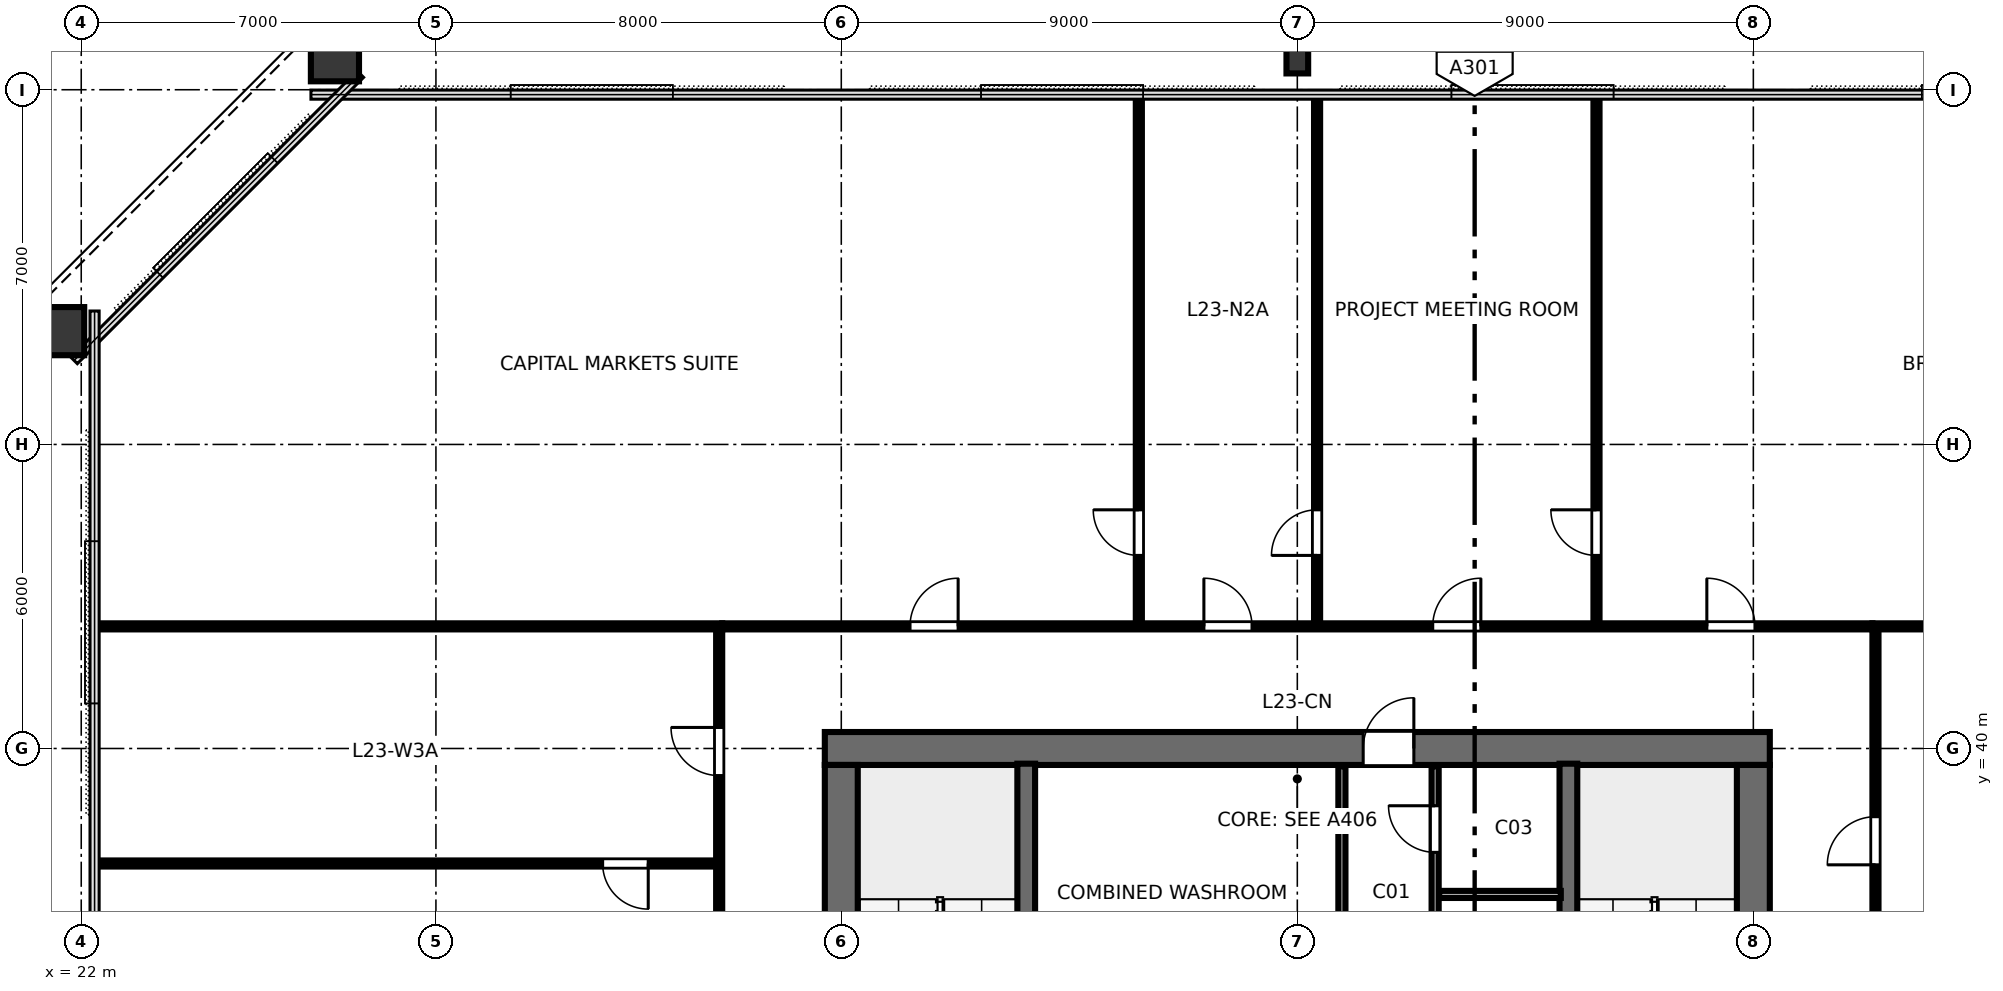
"""IFC4 building model, lengths in metres.
Left out: names, types, materials, properties, quantities, classifications, styles, units other than length and angle.
Written with IfcOpenShell. Run it as: python <this file> out.ifc"""

import sys

from ifc_helpers import new_model, si_unit, direction, frame, frame_2d, origin, origin_2d, place, context, subcontext, project, spatial, rectangle, hollow_rectangle, i_section, extrude, element, fill, save


model = new_model("IFC4")
c1 = context("Model", 3, precision=1e-05, world=origin(), true_north=direction((0.0, 1.0)))
c2 = subcontext(c1, "Body", "Model", "MODEL_VIEW")
j1 = project(units=[si_unit("LENGTHUNIT", "METRE"), si_unit("PLANEANGLEUNIT", "RADIAN")], contexts=[c1])
p1 = place(None, origin())
s1 = spatial("IfcSite", under=j1, at=p1, CompositionType="ELEMENT")
p2 = place(p1, origin())
s2 = spatial("IfcBuilding", under=s1, at=p2, CompositionType="ELEMENT")
p3 = place(p2, frame((0.0, 0.0, 90.4)))
s3 = spatial("IfcBuildingStorey", under=s2, at=p3, CompositionType="ELEMENT", Elevation=90.4)
p4 = place(p3, frame((36.675, 40.0, 0.0), z_axis=(0.0, 0.0, 1.0), x_axis=(1.0, 0.0, 0.0)))
e1 = element("IfcWall", 1, at=p4, inside=s3, PredefinedType="SHEAR", context=c2, shape_type="SweptSolid", body=[
    extrude(rectangle(XDim=18.65, YDim=0.65, at=frame_2d((9.325, 0.0))), origin(), (0.0, 0.0, 1.0), 4.56),
])
p5 = place(p4, frame((10.625, 0.0, 0.0)))
e2 = element("IfcOpeningElement", 2, at=p5, cuts=e1, PredefinedType="OPENING", context=c2, shape_type="SweptSolid", body=[
    extrude(rectangle(XDim=1.0, YDim=2.15, at=frame_2d((0.5, 1.075))), frame((0.0, 0.335, 0.0), z_axis=(0.0, -1.0, 0.0), x_axis=(1.0, 0.0, 0.0)), (0.0, 0.0, 1.0), 0.67),
])
p6 = place(p3, frame((37.0, 24.325, 0.0), z_axis=(0.0, 0.0, 1.0), x_axis=(0.0, 1.0, 0.0)))
e3 = element("IfcWall", 3, at=p6, inside=s3, PredefinedType="SHEAR", context=c2, shape_type="SweptSolid", body=[
    extrude(rectangle(XDim=15.35, YDim=0.65, at=frame_2d((7.675, 0.0))), origin(), (0.0, 0.0, 1.0), 4.56),
])
p7 = place(p6, frame((5.2, 0.0, 0.0)))
e4 = element("IfcOpeningElement", 4, at=p7, cuts=e3, PredefinedType="OPENING", context=c2, shape_type="SweptSolid", body=[
    extrude(rectangle(XDim=1.15, YDim=2.15, at=frame_2d((0.575, 1.075))), frame((0.0, 0.335, 0.0), z_axis=(0.0, -1.0, 0.0), x_axis=(1.0, 0.0, 0.0)), (0.0, 0.0, 1.0), 0.67),
])
p8 = place(p3, frame((55.0, 24.325, 0.0), z_axis=(0.0, 0.0, 1.0), x_axis=(0.0, 1.0, 0.0)))
e5 = element("IfcWall", 5, at=p8, inside=s3, PredefinedType="SHEAR", context=c2, shape_type="SweptSolid", body=[
    extrude(rectangle(XDim=15.35, YDim=0.65, at=frame_2d((7.675, 0.0))), origin(), (0.0, 0.0, 1.0), 4.56),
])
p9 = place(p8, frame((5.2, 0.0, 0.0)))
e6 = element("IfcOpeningElement", 6, at=p9, cuts=e5, PredefinedType="OPENING", context=c2, shape_type="SweptSolid", body=[
    extrude(rectangle(XDim=1.15, YDim=2.15, at=frame_2d((0.575, 1.075))), frame((0.0, 0.335, 0.0), z_axis=(0.0, -1.0, 0.0), x_axis=(1.0, 0.0, 0.0)), (0.0, 0.0, 1.0), 0.67),
])
p10 = place(p3, frame((46.0, 53.563, 0.0), z_axis=(0.0, -0.040192456322, 0.99919195676), x_axis=(1.0, 0.0, 0.0)))
e7 = element("IfcColumn", 7, at=p10, inside=s3, PredefinedType="COLUMN", context=c2, shape_type="SweptSolid", body=[
    extrude(i_section(OverallWidth=0.428, OverallDepth=0.483, WebThickness=0.051, FlangeThickness=0.082, FilletRadius=0.025, at=origin_2d()), origin(), (0.0, 0.0, 1.0), 4.562),
])
p11 = place(p3, frame((27.007, 53.741, 0.0), z_axis=(0.058022511791, -0.040444789527, 0.997495667723), x_axis=(0.571838881264, 0.820365951192, 0.0)))
e8 = element("IfcColumn", 8, at=p11, inside=s3, PredefinedType="COLUMN", context=c2, shape_type="SweptSolid", body=[
    extrude(hollow_rectangle(XDim=0.95, YDim=1.15, WallThickness=0.06, at=origin_2d()), origin(), (0.0, 0.0, 1.0), 4.57),
])
p12 = place(p3, frame((21.484, 48.236, 0.0), z_axis=(0.047661225314, -0.050760273597, 0.997572955841), x_axis=(-0.68284118346, 0.727241170725, 0.069629000955)))
e9 = element("IfcColumn", 9, at=p12, inside=s3, PredefinedType="COLUMN", context=c2, shape_type="SweptSolid", body=[
    extrude(hollow_rectangle(XDim=0.95, YDim=1.15, WallThickness=0.06, at=origin_2d()), origin(), (0.0, 0.0, 1.0), 4.569),
])
for number, where, z_axis, x_axis in (
    (10, (40.65, 32.0, 0.0), (0.0, 0.0, 1.0), (0.0, 1.0, 0.0)),
    (11, (51.35, 32.0, 0.0), (0.0, 0.0, 1.0), (0.0, 1.0, 0.0)),
):
    element("IfcWall", number, at=place(p3, frame(where, z_axis=z_axis, x_axis=x_axis)), inside=s3, PredefinedType="SHEAR", context=c2, shape_type="SweptSolid", body=[
        extrude(rectangle(XDim=7.7, YDim=0.35, at=frame_2d((3.85, 0.0))), origin(), (0.0, 0.0, 1.0), 4.8),
    ])
p13 = place(p3, frame((46.88, 32.05, 0.0), z_axis=(0.0, 0.0, 1.0), x_axis=(0.0, 1.0, 0.0)))
e12 = element("IfcWall", 12, at=p13, inside=s3, PredefinedType="PARTITIONING", context=c2, shape_type="SweptSolid", body=[
    extrude(rectangle(XDim=7.6, YDim=0.14, at=frame_2d((3.8, 0.0))), origin(), (0.0, 0.0, 1.0), 4.56),
])
p14 = place(p13, frame((3.4, 0.0, 0.0)))
e13 = element("IfcOpeningElement", 13, at=p14, cuts=e12, PredefinedType="OPENING", context=c2, shape_type="SweptSolid", body=[
    extrude(rectangle(XDim=0.95, YDim=2.15, at=frame_2d((0.475, 1.075))), frame((0.0, 0.08, 0.0), z_axis=(0.0, -1.0, 0.0), x_axis=(1.0, 0.0, 0.0)), (0.0, 0.0, 1.0), 0.16),
])
p15 = place(p3, frame((48.72, 32.05, 0.0), z_axis=(0.0, 0.0, 1.0), x_axis=(0.0, 1.0, 0.0)))
e14 = element("IfcWall", 14, at=p15, inside=s3, PredefinedType="PARTITIONING", context=c2, shape_type="SweptSolid", body=[
    extrude(rectangle(XDim=7.6, YDim=0.14, at=frame_2d((3.8, 0.0))), origin(), (0.0, 0.0, 1.0), 4.56),
])
p16 = place(p15, frame((0.8, 0.0, 0.0)))
e15 = element("IfcOpeningElement", 15, at=p16, cuts=e14, PredefinedType="OPENING", context=c2, shape_type="SweptSolid", body=[
    extrude(rectangle(XDim=0.9, YDim=2.15, at=frame_2d((0.45, 1.075))), frame((0.0, 0.08, 0.0), z_axis=(0.0, -1.0, 0.0), x_axis=(1.0, 0.0, 0.0)), (0.0, 0.0, 1.0), 0.16),
])
p17 = place(p15, frame((3.35, 0.0, 0.0)))
e16 = element("IfcOpeningElement", 16, at=p17, cuts=e14, PredefinedType="OPENING", context=c2, shape_type="SweptSolid", body=[
    extrude(rectangle(XDim=0.9, YDim=2.15, at=frame_2d((0.45, 1.075))), frame((0.0, 0.08, 0.0), z_axis=(0.0, -1.0, 0.0), x_axis=(1.0, 0.0, 0.0)), (0.0, 0.0, 1.0), 0.16),
])
p18 = place(p15, frame((5.9, 0.0, 0.0)))
e17 = element("IfcOpeningElement", 17, at=p18, cuts=e14, PredefinedType="OPENING", context=c2, shape_type="SweptSolid", body=[
    extrude(rectangle(XDim=0.92, YDim=2.15, at=frame_2d((0.46, 1.075))), frame((0.0, 0.08, 0.0), z_axis=(0.0, -1.0, 0.0), x_axis=(1.0, 0.0, 0.0)), (0.0, 0.0, 1.0), 0.16),
])
p19 = place(p3, frame((48.8, 37.12, 0.0), z_axis=(0.0, 0.0, 1.0), x_axis=(1.0, 0.0, 0.0)))
e18 = element("IfcWall", 18, at=p19, inside=s3, PredefinedType="PARTITIONING", context=c2, shape_type="SweptSolid", body=[
    extrude(rectangle(XDim=2.4, YDim=0.14, at=frame_2d((1.2, 0.0))), origin(), (0.0, 0.0, 1.0), 4.56),
])
p20 = place(p3, frame((42.872, 42.41, 0.0), z_axis=(0.0, 0.0, 1.0), x_axis=(0.0, 1.0, 0.0)))
e19 = element("IfcWall", 19, at=p20, inside=s3, PredefinedType="PARTITIONING", context=c2, shape_type="SweptSolid", body=[
    extrude(rectangle(XDim=10.493, YDim=0.12, at=frame_2d((5.247, 0.0))), origin(), (0.0, 0.0, 1.0), 3.84),
])
p21 = place(p20, frame((1.4, 0.0, 0.0)))
e20 = element("IfcOpeningElement", 20, at=p21, cuts=e19, PredefinedType="OPENING", context=c2, shape_type="SweptSolid", body=[
    extrude(rectangle(XDim=0.9, YDim=2.15, at=frame_2d((0.45, 1.075))), frame((0.0, 0.07, 0.0), z_axis=(0.0, -1.0, 0.0), x_axis=(1.0, 0.0, 0.0)), (0.0, 0.0, 1.0), 0.14),
])
p22 = place(p3, frame((46.39, 42.41, 0.0), z_axis=(0.0, 0.0, 1.0), x_axis=(0.0, 1.0, 0.0)))
e21 = element("IfcWall", 21, at=p22, inside=s3, PredefinedType="PARTITIONING", context=c2, shape_type="SweptSolid", body=[
    extrude(rectangle(XDim=10.493, YDim=0.12, at=frame_2d((5.247, 0.0))), origin(), (0.0, 0.0, 1.0), 3.84),
])
p23 = place(p22, frame((1.4, 0.0, 0.0)))
e22 = element("IfcOpeningElement", 22, at=p23, cuts=e21, PredefinedType="OPENING", context=c2, shape_type="SweptSolid", body=[
    extrude(rectangle(XDim=0.9, YDim=2.15, at=frame_2d((0.45, 1.075))), frame((0.0, 0.07, 0.0), z_axis=(0.0, -1.0, 0.0), x_axis=(1.0, 0.0, 0.0)), (0.0, 0.0, 1.0), 0.14),
])
p24 = place(p3, frame((51.904, 42.41, 0.0), z_axis=(0.0, 0.0, 1.0), x_axis=(0.0, 1.0, 0.0)))
e23 = element("IfcWall", 23, at=p24, inside=s3, PredefinedType="PARTITIONING", context=c2, shape_type="SweptSolid", body=[
    extrude(rectangle(XDim=10.493, YDim=0.12, at=frame_2d((5.247, 0.0))), origin(), (0.0, 0.0, 1.0), 3.84),
])
p25 = place(p24, frame((1.4, 0.0, 0.0)))
e24 = element("IfcOpeningElement", 24, at=p25, cuts=e23, PredefinedType="OPENING", context=c2, shape_type="SweptSolid", body=[
    extrude(rectangle(XDim=0.9, YDim=2.15, at=frame_2d((0.45, 1.075))), frame((0.0, 0.07, 0.0), z_axis=(0.0, -1.0, 0.0), x_axis=(1.0, 0.0, 0.0)), (0.0, 0.0, 1.0), 0.14),
])
p26 = place(p3, frame((34.65, 42.41, 0.0), z_axis=(0.0, 0.0, 1.0), x_axis=(1.0, 0.0, 0.0)))
e25 = element("IfcWall", 25, at=p26, inside=s3, PredefinedType="PARTITIONING", context=c2, shape_type="SweptSolid", body=[
    extrude(rectangle(XDim=22.7, YDim=0.12, at=frame_2d((11.35, 0.0))), origin(), (0.0, 0.0, 1.0), 3.84),
])
p27 = place(p26, frame((3.706, 0.0, 0.0)))
e26 = element("IfcOpeningElement", 26, at=p27, cuts=e25, PredefinedType="OPENING", context=c2, shape_type="SweptSolid", body=[
    extrude(rectangle(XDim=0.95, YDim=2.15, at=frame_2d((0.475, 1.075))), frame((0.0, 0.07, 0.0), z_axis=(0.0, -1.0, 0.0), x_axis=(1.0, 0.0, 0.0)), (0.0, 0.0, 1.0), 0.14),
])
p28 = place(p26, frame((9.506, 0.0, 0.0)))
e27 = element("IfcOpeningElement", 27, at=p28, cuts=e25, PredefinedType="OPENING", context=c2, shape_type="SweptSolid", body=[
    extrude(rectangle(XDim=0.95, YDim=2.15, at=frame_2d((0.475, 1.075))), frame((0.0, 0.07, 0.0), z_axis=(0.0, -1.0, 0.0), x_axis=(1.0, 0.0, 0.0)), (0.0, 0.0, 1.0), 0.14),
])
p29 = place(p26, frame((14.022, 0.0, 0.0)))
e28 = element("IfcOpeningElement", 28, at=p29, cuts=e25, PredefinedType="OPENING", context=c2, shape_type="SweptSolid", body=[
    extrude(rectangle(XDim=0.95, YDim=2.15, at=frame_2d((0.475, 1.075))), frame((0.0, 0.07, 0.0), z_axis=(0.0, -1.0, 0.0), x_axis=(1.0, 0.0, 0.0)), (0.0, 0.0, 1.0), 0.14),
])
p30 = place(p26, frame((19.432, 0.0, 0.0)))
e29 = element("IfcOpeningElement", 29, at=p30, cuts=e25, PredefinedType="OPENING", context=c2, shape_type="SweptSolid", body=[
    extrude(rectangle(XDim=0.95, YDim=2.15, at=frame_2d((0.475, 1.075))), frame((0.0, 0.07, 0.0), z_axis=(0.0, -1.0, 0.0), x_axis=(1.0, 0.0, 0.0)), (0.0, 0.0, 1.0), 0.14),
])
p31 = place(p3, frame((34.59, 37.73, 0.0), z_axis=(0.0, 0.0, 1.0), x_axis=(-1.0, 0.0, 0.0)))
e30 = element("IfcWall", 30, at=p31, inside=s3, PredefinedType="PARTITIONING", context=c2, shape_type="SweptSolid", body=[
    extrude(rectangle(XDim=12.327, YDim=0.12, at=frame_2d((6.164, 0.0))), origin(), (0.0, 0.0, 1.0), 3.84),
])
p32 = place(p31, frame((1.4, 0.0, 0.0)))
e31 = element("IfcOpeningElement", 31, at=p32, cuts=e30, PredefinedType="OPENING", context=c2, shape_type="SweptSolid", body=[
    extrude(rectangle(XDim=0.9, YDim=2.15, at=frame_2d((0.45, 1.075))), frame((0.0, 0.07, 0.0), z_axis=(0.0, -1.0, 0.0), x_axis=(1.0, 0.0, 0.0)), (0.0, 0.0, 1.0), 0.14),
])
p33 = place(p3, frame((34.59, 21.65, 0.0), z_axis=(0.0, 0.0, 1.0), x_axis=(0.0, 1.0, 0.0)))
e32 = element("IfcWall", 32, at=p33, inside=s3, PredefinedType="PARTITIONING", context=c2, shape_type="SweptSolid", body=[
    extrude(rectangle(XDim=20.7, YDim=0.12, at=frame_2d((10.35, 0.0))), origin(), (0.0, 0.0, 1.0), 3.84),
])
p34 = place(p33, frame((3.176, 0.0, 0.0)))
e33 = element("IfcOpeningElement", 33, at=p34, cuts=e32, PredefinedType="OPENING", context=c2, shape_type="SweptSolid", body=[
    extrude(rectangle(XDim=0.95, YDim=2.15, at=frame_2d((0.475, 1.075))), frame((0.0, 0.07, 0.0), z_axis=(0.0, -1.0, 0.0), x_axis=(1.0, 0.0, 0.0)), (0.0, 0.0, 1.0), 0.14),
])
p35 = place(p33, frame((11.116, 0.0, 0.0)))
e34 = element("IfcOpeningElement", 34, at=p35, cuts=e32, PredefinedType="OPENING", context=c2, shape_type="SweptSolid", body=[
    extrude(rectangle(XDim=0.95, YDim=2.15, at=frame_2d((0.475, 1.075))), frame((0.0, 0.07, 0.0), z_axis=(0.0, -1.0, 0.0), x_axis=(1.0, 0.0, 0.0)), (0.0, 0.0, 1.0), 0.14),
])
p36 = place(p33, frame((17.815, 0.0, 0.0)))
e35 = element("IfcOpeningElement", 35, at=p36, cuts=e32, PredefinedType="OPENING", context=c2, shape_type="SweptSolid", body=[
    extrude(rectangle(XDim=0.95, YDim=2.15, at=frame_2d((0.475, 1.075))), frame((0.0, 0.07, 0.0), z_axis=(0.0, -1.0, 0.0), x_axis=(1.0, 0.0, 0.0)), (0.0, 0.0, 1.0), 0.14),
])
p37 = place(p3, frame((57.41, 21.65, 0.0), z_axis=(0.0, 0.0, 1.0), x_axis=(0.0, 1.0, 0.0)))
e36 = element("IfcWall", 36, at=p37, inside=s3, PredefinedType="PARTITIONING", context=c2, shape_type="SweptSolid", body=[
    extrude(rectangle(XDim=20.7, YDim=0.12, at=frame_2d((10.35, 0.0))), origin(), (0.0, 0.0, 1.0), 3.84),
])
p38 = place(p37, frame((5.904, 0.0, 0.0)))
e37 = element("IfcOpeningElement", 37, at=p38, cuts=e36, PredefinedType="OPENING", context=c2, shape_type="SweptSolid", body=[
    extrude(rectangle(XDim=0.95, YDim=2.15, at=frame_2d((0.475, 1.075))), frame((0.0, 0.07, 0.0), z_axis=(0.0, -1.0, 0.0), x_axis=(1.0, 0.0, 0.0)), (0.0, 0.0, 1.0), 0.14),
])
p39 = place(p37, frame((16.054, 0.0, 0.0)))
e38 = element("IfcOpeningElement", 38, at=p39, cuts=e36, PredefinedType="OPENING", context=c2, shape_type="SweptSolid", body=[
    extrude(rectangle(XDim=0.95, YDim=2.15, at=frame_2d((0.475, 1.075))), frame((0.0, 0.07, 0.0), z_axis=(0.0, -1.0, 0.0), x_axis=(1.0, 0.0, 0.0)), (0.0, 0.0, 1.0), 0.14),
])
for number, where, z_axis, x_axis in (
    (39, (34.65, 42.41, 0.0), (0.0, 0.0, 1.0), (-1.0, 0.0, 0.0)),
    (40, (57.35, 42.41, 0.0), (0.0, 0.0, 1.0), (1.0, 0.0, 0.0)),
):
    element("IfcWall", number, at=place(p3, frame(where, z_axis=z_axis, x_axis=x_axis)), inside=s3, PredefinedType="PARTITIONING", context=c2, shape_type="SweptSolid", body=[
        extrude(rectangle(XDim=12.387, YDim=0.12, at=frame_2d((6.193, 0.0))), origin(), (0.0, 0.0, 1.0), 3.84),
    ])
p40 = place(p5, origin())
e41 = element("IfcDoor", 41, at=p40, inside=s3, OperationType="SINGLE_SWING_RIGHT", PredefinedType="DOOR", context=c2, shape_type="SweptSolid", body=[
    extrude(rectangle(XDim=1.0, YDim=2.15, at=frame_2d((0.5, 1.075))), frame((0.0, 0.025, 0.0), z_axis=(0.0, -1.0, 0.0), x_axis=(1.0, 0.0, 0.0)), (0.0, 0.0, 1.0), 0.05),
])
fill(e2, e41)
p41 = place(p18, origin())
e42 = element("IfcDoor", 42, at=p41, inside=s3, OperationType="SINGLE_SWING_RIGHT", PredefinedType="DOOR", context=c2, shape_type="SweptSolid", body=[
    extrude(rectangle(XDim=0.92, YDim=2.15, at=frame_2d((0.46, 1.075))), frame((0.0, 0.025, 0.0), z_axis=(0.0, -1.0, 0.0), x_axis=(1.0, 0.0, 0.0)), (0.0, 0.0, 1.0), 0.05),
])
fill(e17, e42)
p42 = place(p21, origin())
e43 = element("IfcDoor", 43, at=p42, inside=s3, OperationType="SINGLE_SWING_RIGHT", PredefinedType="DOOR", context=c2, shape_type="SweptSolid", body=[
    extrude(rectangle(XDim=0.9, YDim=2.15, at=frame_2d((0.45, 1.075))), frame((0.0, 0.025, 0.0), z_axis=(0.0, -1.0, 0.0), x_axis=(1.0, 0.0, 0.0)), (0.0, 0.0, 1.0), 0.05),
])
fill(e20, e43)
p43 = place(p23, origin())
e44 = element("IfcDoor", 44, at=p43, inside=s3, OperationType="SINGLE_SWING_LEFT", PredefinedType="DOOR", context=c2, shape_type="SweptSolid", body=[
    extrude(rectangle(XDim=0.9, YDim=2.15, at=frame_2d((0.45, 1.075))), frame((0.0, 0.025, 0.0), z_axis=(0.0, -1.0, 0.0), x_axis=(1.0, 0.0, 0.0)), (0.0, 0.0, 1.0), 0.05),
])
fill(e22, e44)
p44 = place(p25, origin())
e45 = element("IfcDoor", 45, at=p44, inside=s3, OperationType="SINGLE_SWING_RIGHT", PredefinedType="DOOR", context=c2, shape_type="SweptSolid", body=[
    extrude(rectangle(XDim=0.9, YDim=2.15, at=frame_2d((0.45, 1.075))), frame((0.0, 0.025, 0.0), z_axis=(0.0, -1.0, 0.0), x_axis=(1.0, 0.0, 0.0)), (0.0, 0.0, 1.0), 0.05),
])
fill(e24, e45)
p45 = place(p27, origin())
e46 = element("IfcDoor", 46, at=p45, inside=s3, OperationType="SINGLE_SWING_RIGHT", PredefinedType="DOOR", context=c2, shape_type="SweptSolid", body=[
    extrude(rectangle(XDim=0.95, YDim=2.15, at=frame_2d((0.475, 1.075))), frame((0.0, 0.025, 0.0), z_axis=(0.0, -1.0, 0.0), x_axis=(1.0, 0.0, 0.0)), (0.0, 0.0, 1.0), 0.05),
])
fill(e26, e46)
p46 = place(p28, origin())
e47 = element("IfcDoor", 47, at=p46, inside=s3, OperationType="SINGLE_SWING_LEFT", PredefinedType="DOOR", context=c2, shape_type="SweptSolid", body=[
    extrude(rectangle(XDim=0.95, YDim=2.15, at=frame_2d((0.475, 1.075))), frame((0.0, 0.025, 0.0), z_axis=(0.0, -1.0, 0.0), x_axis=(1.0, 0.0, 0.0)), (0.0, 0.0, 1.0), 0.05),
])
fill(e27, e47)
p47 = place(p29, origin())
e48 = element("IfcDoor", 48, at=p47, inside=s3, OperationType="SINGLE_SWING_RIGHT", PredefinedType="DOOR", context=c2, shape_type="SweptSolid", body=[
    extrude(rectangle(XDim=0.95, YDim=2.15, at=frame_2d((0.475, 1.075))), frame((0.0, 0.025, 0.0), z_axis=(0.0, -1.0, 0.0), x_axis=(1.0, 0.0, 0.0)), (0.0, 0.0, 1.0), 0.05),
])
fill(e28, e48)
p48 = place(p30, origin())
e49 = element("IfcDoor", 49, at=p48, inside=s3, OperationType="SINGLE_SWING_LEFT", PredefinedType="DOOR", context=c2, shape_type="SweptSolid", body=[
    extrude(rectangle(XDim=0.95, YDim=2.15, at=frame_2d((0.475, 1.075))), frame((0.0, 0.025, 0.0), z_axis=(0.0, -1.0, 0.0), x_axis=(1.0, 0.0, 0.0)), (0.0, 0.0, 1.0), 0.05),
])
fill(e29, e49)
p49 = place(p32, origin())
e50 = element("IfcDoor", 50, at=p49, inside=s3, OperationType="SINGLE_SWING_LEFT", PredefinedType="DOOR", context=c2, shape_type="SweptSolid", body=[
    extrude(rectangle(XDim=0.9, YDim=2.15, at=frame_2d((0.45, 1.075))), frame((0.0, 0.025, 0.0), z_axis=(0.0, -1.0, 0.0), x_axis=(1.0, 0.0, 0.0)), (0.0, 0.0, 1.0), 0.05),
])
fill(e31, e50)
p50 = place(p36, origin())
e51 = element("IfcDoor", 51, at=p50, inside=s3, OperationType="SINGLE_SWING_RIGHT", PredefinedType="DOOR", context=c2, shape_type="SweptSolid", body=[
    extrude(rectangle(XDim=0.95, YDim=2.15, at=frame_2d((0.475, 1.075))), frame((0.0, 0.025, 0.0), z_axis=(0.0, -1.0, 0.0), x_axis=(1.0, 0.0, 0.0)), (0.0, 0.0, 1.0), 0.05),
])
fill(e35, e51)
p51 = place(p39, origin())
e52 = element("IfcDoor", 52, at=p51, inside=s3, OperationType="SINGLE_SWING_LEFT", PredefinedType="DOOR", context=c2, shape_type="SweptSolid", body=[
    extrude(rectangle(XDim=0.95, YDim=2.15, at=frame_2d((0.475, 1.075))), frame((0.0, 0.025, 0.0), z_axis=(0.0, -1.0, 0.0), x_axis=(1.0, 0.0, 0.0)), (0.0, 0.0, 1.0), 0.05),
])
fill(e38, e52)
save(model, sys.argv[1])
